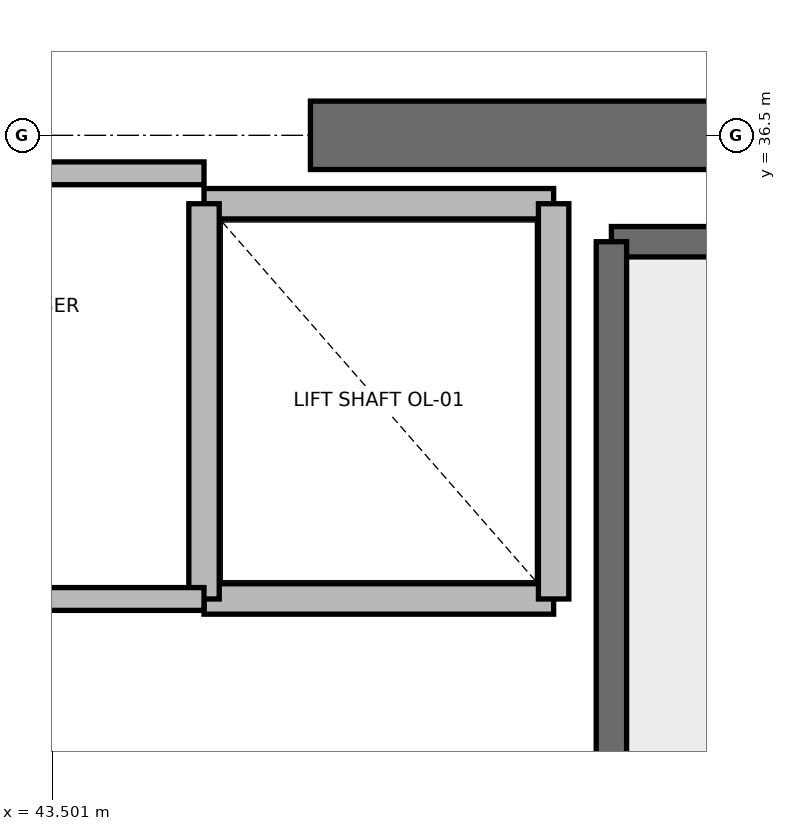
"""IFC4 building model, lengths in metres.
Left out: names, types, materials, properties, quantities, classifications, styles, units other than length and angle.
Written with IfcOpenShell. Run it as: python <this file> out.ifc"""

import sys

from ifc_helpers import new_model, si_unit, direction, frame, frame_2d, origin, place, context, subcontext, project, spatial, rectangle, extrude, element, save


model = new_model("IFC4")
c1 = context("Model", 3, precision=1e-05, world=origin(), true_north=direction((0.0, 1.0)))
c2 = subcontext(c1, "Body", "Model", "MODEL_VIEW")
j1 = project(units=[si_unit("LENGTHUNIT", "METRE"), si_unit("PLANEANGLEUNIT", "RADIAN")], contexts=[c1])
p1 = place(None, origin())
s1 = spatial("IfcSite", under=j1, at=p1, CompositionType="ELEMENT")
p2 = place(p1, origin())
s2 = spatial("IfcBuilding", under=s1, at=p2, CompositionType="ELEMENT")
p3 = place(p2, frame((0.0, 0.0, 243.2)))
s3 = spatial("IfcBuildingStorey", under=s2, at=p3, CompositionType="ELEMENT", Elevation=243.2)
p4 = place(p3, frame((45.2, 36.5, 0.0), z_axis=(0.0, 0.0, 1.0), x_axis=(1.0, 0.0, 0.0)))
e1 = element("IfcWall", 1, at=p4, inside=s3, PredefinedType="SHEAR", context=c2, shape_type="SweptSolid", body=[
    extrude(rectangle(XDim=5.8, YDim=0.45, at=frame_2d((2.9, 0.0))), origin(), (0.0, 0.0, 1.0), 3.785),
])
p5 = place(p3, frame((47.18, 35.8, 0.0), z_axis=(0.0, 0.0, 1.0), x_axis=(1.0, 0.0, 0.0)))
e2 = element("IfcWall", 2, at=p5, inside=s3, PredefinedType="SOLIDWALL", context=c2, shape_type="SweptSolid", body=[
    extrude(rectangle(XDim=3.12, YDim=0.2, at=frame_2d((1.56, 0.0))), origin(), (0.0, 0.0, 1.0), 3.785),
])
p6 = place(p3, frame((47.18, 27.62, 0.0), z_axis=(0.0, 0.0, 1.0), x_axis=(0.0, 1.0, 0.0)))
e3 = element("IfcWall", 3, at=p6, inside=s3, PredefinedType="SOLIDWALL", context=c2, shape_type="SweptSolid", body=[
    extrude(rectangle(XDim=8.18, YDim=0.2, at=frame_2d((4.09, 0.0))), origin(), (0.0, 0.0, 1.0), 3.785),
])
p7 = place(p3, frame((44.5, 33.45, 0.0), z_axis=(0.0, 0.0, 1.0), x_axis=(1.0, 0.0, 0.0)))
e4 = element("IfcWall", 4, at=p7, inside=s3, PredefinedType="SOLIDWALL", context=c2, shape_type="SweptSolid", body=[
    extrude(rectangle(XDim=2.3, YDim=0.2, at=frame_2d((1.15, 0.0))), origin(), (0.0, 0.0, 1.0), 3.785),
])
p8 = place(p3, frame((46.8, 36.05, 0.0), z_axis=(0.0, 0.0, 1.0), x_axis=(-1.0, 0.0, 0.0)))
e5 = element("IfcWall", 5, at=p8, inside=s3, PredefinedType="SOLIDWALL", context=c2, shape_type="SweptSolid", body=[
    extrude(rectangle(XDim=2.3, YDim=0.2, at=frame_2d((1.15, 0.0))), origin(), (0.0, 0.0, 1.0), 2.865),
])
p9 = place(p3, frame((44.5, 36.05, 0.0), z_axis=(0.0, 0.0, 1.0), x_axis=(0.0, -1.0, 0.0)))
e6 = element("IfcWall", 6, at=p9, inside=s3, PredefinedType="SOLIDWALL", context=c2, shape_type="SweptSolid", body=[
    extrude(rectangle(XDim=2.6, YDim=0.2, at=frame_2d((1.3, 0.0))), origin(), (0.0, 0.0, 1.0), 2.865),
])
p10 = place(p3, frame((46.8, 33.45, 0.0), z_axis=(0.0, 0.0, 1.0), x_axis=(0.0, 1.0, 0.0)))
e7 = element("IfcWall", 7, at=p10, inside=s3, PredefinedType="SOLIDWALL", context=c2, shape_type="SweptSolid", body=[
    extrude(rectangle(XDim=2.6, YDim=0.2, at=frame_2d((1.3, 0.0))), origin(), (0.0, 0.0, 1.0), 3.785),
])
p11 = place(p3, frame((41.56, 36.25, 0.0), z_axis=(0.0, 0.0, 1.0), x_axis=(1.0, 0.0, 0.0)))
e8 = element("IfcWall", 8, at=p11, inside=s3, PredefinedType="PARTITIONING", context=c2, shape_type="SweptSolid", body=[
    extrude(rectangle(XDim=2.94, YDim=0.15, at=frame_2d((1.47, 0.0))), origin(), (0.0, 0.0, 1.0), 2.85),
])
p12 = place(p3, frame((41.56, 33.45, 0.0), z_axis=(0.0, 0.0, 1.0), x_axis=(1.0, 0.0, 0.0)))
e9 = element("IfcWall", 9, at=p12, inside=s3, PredefinedType="PARTITIONING", context=c2, shape_type="SweptSolid", body=[
    extrude(rectangle(XDim=2.94, YDim=0.15, at=frame_2d((1.47, 0.0))), origin(), (0.0, 0.0, 1.0), 2.85),
])
p13 = place(p12, frame((1.03, 0.0, 0.0)))
e10 = element("IfcOpeningElement", 10, at=p13, cuts=e9, PredefinedType="OPENING", context=c2, shape_type="SweptSolid", body=[
    extrude(rectangle(XDim=0.88, YDim=2.1, at=frame_2d((0.44, 1.05))), frame((0.0, 0.075, 0.0), z_axis=(0.0, -1.0, 0.0), x_axis=(1.0, 0.0, 0.0)), (0.0, 0.0, 1.0), 0.15),
])
save(model, sys.argv[1])
